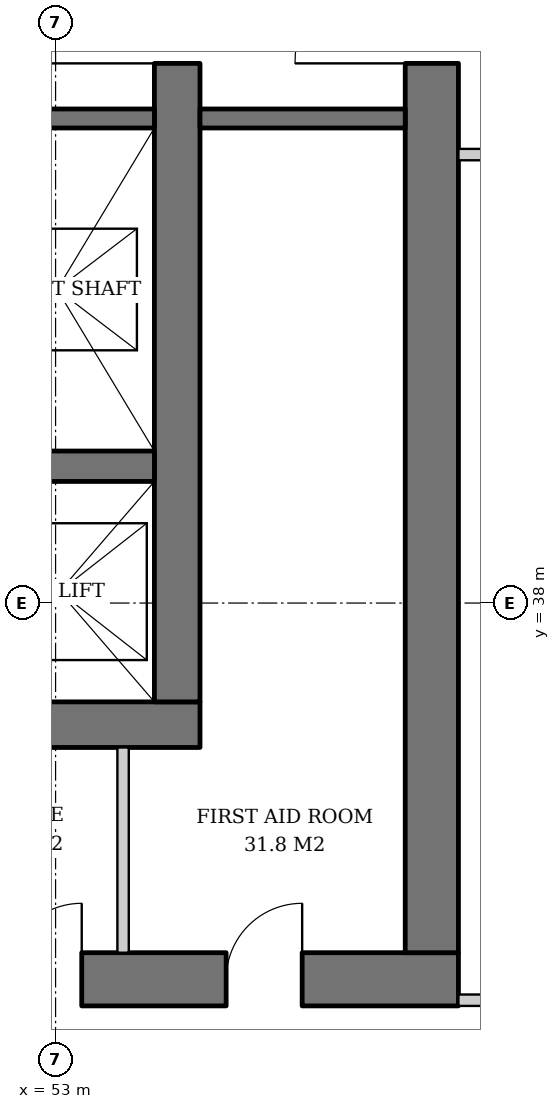
"""IFC4 building model, lengths in metres.
Left out: names, types, materials, properties, quantities, classifications, styles, units other than length and angle.
Written with IfcOpenShell. Run it as: python <this file> out.ifc"""

import sys

from ifc_helpers import new_model, si_unit, direction, frame, frame_2d, origin, place, context, subcontext, project, spatial, rectangle, extrude, element, fill, save


model = new_model("IFC4")
c1 = context("Model", 3, precision=1e-05, world=origin(), true_north=direction((0.0, 1.0)))
c2 = subcontext(c1, "Body", "Model", "MODEL_VIEW")
j1 = project(units=[si_unit("LENGTHUNIT", "METRE"), si_unit("PLANEANGLEUNIT", "RADIAN")], contexts=[c1])
p1 = place(None, origin())
s1 = spatial("IfcSite", under=j1, at=p1, CompositionType="ELEMENT")
p2 = place(p1, origin())
s2 = spatial("IfcBuilding", under=s1, at=p2, CompositionType="ELEMENT")
p3 = place(p2, frame((0.0, 0.0, 150.2)))
s3 = spatial("IfcBuildingStorey", under=s2, at=p3, CompositionType="ELEMENT", Elevation=150.2)
p4 = place(p3, frame((35.1, 36.4, 0.0), z_axis=(0.0, 0.0, 1.0), x_axis=(1.0, 0.0, 0.0)))
e1 = element("IfcWall", 1, at=p4, inside=s3, PredefinedType="SHEAR", context=c2, shape_type="SweptSolid", body=[
    extrude(rectangle(XDim=19.8, YDim=0.6, at=frame_2d((9.9, 0.0))), origin(), (0.0, 0.0, 1.0), 3.8),
])
p5 = place(p4, frame((3.9, 0.0, 0.0)))
e2 = element("IfcOpeningElement", 2, at=p5, cuts=e1, PredefinedType="OPENING", context=c2, shape_type="SweptSolid", body=[
    extrude(rectangle(XDim=1.0, YDim=2.1, at=frame_2d((0.5, 1.05))), frame((0.0, 0.31, 0.0), z_axis=(0.0, -1.0, 0.0), x_axis=(1.0, 0.0, 0.0)), (0.0, 0.0, 1.0), 0.62),
])
p6 = place(p4, frame((15.35, 0.0, 0.0)))
e3 = element("IfcOpeningElement", 3, at=p6, cuts=e1, PredefinedType="OPENING", context=c2, shape_type="SweptSolid", body=[
    extrude(rectangle(XDim=1.0, YDim=2.1, at=frame_2d((0.5, 1.05))), frame((0.0, 0.31, 0.0), z_axis=(0.0, -1.0, 0.0), x_axis=(1.0, 0.0, 0.0)), (0.0, 0.0, 1.0), 0.62),
])
p7 = place(p3, frame((54.6, 36.7, 0.0), z_axis=(0.0, 0.0, 1.0), x_axis=(0.0, 1.0, 0.0)))
e4 = element("IfcWall", 4, at=p7, inside=s3, PredefinedType="SHEAR", context=c2, shape_type="SweptSolid", body=[
    extrude(rectangle(XDim=18.6, YDim=0.6, at=frame_2d((9.3, 0.0))), origin(), (0.0, 0.0, 1.0), 3.8),
])
p8 = place(p7, frame((8.4, 0.0, 0.0)))
e5 = element("IfcOpeningElement", 5, at=p8, cuts=e4, PredefinedType="OPENING", context=c2, shape_type="SweptSolid", body=[
    extrude(rectangle(XDim=1.8, YDim=2.4, at=frame_2d((0.9, 1.2))), frame((0.0, 0.31, 0.0), z_axis=(0.0, -1.0, 0.0), x_axis=(1.0, 0.0, 0.0)), (0.0, 0.0, 1.0), 0.62),
])
p9 = place(p3, frame((31.7, 33.05, 0.0), z_axis=(0.0, 0.0, 1.0), x_axis=(1.0, 0.0, 0.0)))
e6 = element("IfcWall", 6, at=p9, inside=s3, PredefinedType="SHEAR", context=c2, shape_type="SweptSolid", body=[
    extrude(rectangle(XDim=26.6, YDim=0.7, at=frame_2d((13.3, 0.0))), origin(), (0.0, 0.0, 1.0), 3.8),
])
p10 = place(p9, frame((7.3, 0.0, 0.0)))
e7 = element("IfcOpeningElement", 7, at=p10, cuts=e6, PredefinedType="OPENING", context=c2, shape_type="SweptSolid", body=[
    extrude(rectangle(XDim=1.0, YDim=2.1, at=frame_2d((0.5, 1.05))), frame((0.0, 0.36, 0.0), z_axis=(0.0, -1.0, 0.0), x_axis=(1.0, 0.0, 0.0)), (0.0, 0.0, 1.0), 0.72),
])
p11 = place(p9, frame((18.75, 0.0, 0.0)))
e8 = element("IfcOpeningElement", 8, at=p11, cuts=e6, PredefinedType="OPENING", context=c2, shape_type="SweptSolid", body=[
    extrude(rectangle(XDim=1.0, YDim=2.1, at=frame_2d((0.5, 1.05))), frame((0.0, 0.36, 0.0), z_axis=(0.0, -1.0, 0.0), x_axis=(1.0, 0.0, 0.0)), (0.0, 0.0, 1.0), 0.72),
])
p12 = place(p9, frame((1.85, 0.0, 0.0)))
e9 = element("IfcOpeningElement", 9, at=p12, cuts=e6, PredefinedType="OPENING", context=c2, shape_type="SweptSolid", body=[
    extrude(rectangle(XDim=1.0, YDim=2.1, at=frame_2d((0.5, 1.05))), frame((0.0, 0.36, 0.0), z_axis=(0.0, -1.0, 0.0), x_axis=(1.0, 0.0, 0.0)), (0.0, 0.0, 1.0), 0.72),
])
p13 = place(p9, frame((4.7, 0.0, 0.0)))
e10 = element("IfcOpeningElement", 10, at=p13, cuts=e6, PredefinedType="OPENING", context=c2, shape_type="SweptSolid", body=[
    extrude(rectangle(XDim=1.0, YDim=2.1, at=frame_2d((0.5, 1.05))), frame((0.0, 0.36, 0.0), z_axis=(0.0, -1.0, 0.0), x_axis=(1.0, 0.0, 0.0)), (0.0, 0.0, 1.0), 0.72),
])
p14 = place(p9, frame((12.44, 0.0, 0.0)))
e11 = element("IfcOpeningElement", 11, at=p14, cuts=e6, PredefinedType="OPENING", context=c2, shape_type="SweptSolid", body=[
    extrude(rectangle(XDim=1.0, YDim=2.1, at=frame_2d((0.5, 1.05))), frame((0.0, 0.36, 0.0), z_axis=(0.0, -1.0, 0.0), x_axis=(1.0, 0.0, 0.0)), (0.0, 0.0, 1.0), 0.72),
])
p15 = place(p9, frame((20.644, 0.0, 0.0)))
e12 = element("IfcOpeningElement", 12, at=p15, cuts=e6, PredefinedType="OPENING", context=c2, shape_type="SweptSolid", body=[
    extrude(rectangle(XDim=1.0, YDim=2.1, at=frame_2d((0.5, 1.05))), frame((0.0, 0.36, 0.0), z_axis=(0.0, -1.0, 0.0), x_axis=(1.0, 0.0, 0.0)), (0.0, 0.0, 1.0), 0.72),
])
p16 = place(p9, frame((23.544, 0.0, 0.0)))
e13 = element("IfcOpeningElement", 13, at=p16, cuts=e6, PredefinedType="OPENING", context=c2, shape_type="SweptSolid", body=[
    extrude(rectangle(XDim=1.0, YDim=2.1, at=frame_2d((0.5, 1.05))), frame((0.0, 0.36, 0.0), z_axis=(0.0, -1.0, 0.0), x_axis=(1.0, 0.0, 0.0)), (0.0, 0.0, 1.0), 0.72),
])
p17 = place(p3, frame((57.95, 33.4, 0.0), z_axis=(0.0, 0.0, 1.0), x_axis=(0.0, 1.0, 0.0)))
e14 = element("IfcWall", 14, at=p17, inside=s3, PredefinedType="SHEAR", context=c2, shape_type="SweptSolid", body=[
    extrude(rectangle(XDim=25.2, YDim=0.7, at=frame_2d((12.6, 0.0))), origin(), (0.0, 0.0, 1.0), 3.8),
])
p18 = place(p17, frame((11.7, 0.0, 0.0)))
e15 = element("IfcOpeningElement", 15, at=p18, cuts=e14, PredefinedType="OPENING", context=c2, shape_type="SweptSolid", body=[
    extrude(rectangle(XDim=1.8, YDim=2.4, at=frame_2d((0.9, 1.2))), frame((0.0, 0.36, 0.0), z_axis=(0.0, -1.0, 0.0), x_axis=(1.0, 0.0, 0.0)), (0.0, 0.0, 1.0), 0.72),
])
p19 = place(p3, frame((35.7, 39.8, 0.0), z_axis=(0.0, 0.0, 1.0), x_axis=(1.0, 0.0, 0.0)))
e16 = element("IfcWall", 16, at=p19, inside=s3, PredefinedType="SHEAR", context=c2, shape_type="SweptSolid", body=[
    extrude(rectangle(XDim=18.6, YDim=0.4, at=frame_2d((9.3, 0.0))), origin(), (0.0, 0.0, 1.0), 3.8),
])
p20 = place(p3, frame((48.93, 44.375, 0.0), z_axis=(0.0, 0.0, 1.0), x_axis=(1.0, 0.0, 0.0)))
e17 = element("IfcWall", 17, at=p20, inside=s3, PredefinedType="SHEAR", context=c2, shape_type="SweptSolid", body=[
    extrude(rectangle(XDim=5.37, YDim=0.25, at=frame_2d((2.685, 0.0))), origin(), (0.0, 0.0, 1.0), 3.8),
])
p21 = place(p3, frame((54.9, 44.375, 0.0), z_axis=(0.0, 0.0, 1.0), x_axis=(1.0, 0.0, 0.0)))
e18 = element("IfcWall", 18, at=p21, inside=s3, PredefinedType="SOLIDWALL", context=c2, shape_type="SweptSolid", body=[
    extrude(rectangle(XDim=2.7, YDim=0.25, at=frame_2d((1.35, 0.0))), origin(), (0.0, 0.0, 1.0), 3.62),
])
p22 = place(p3, frame((53.888, 33.4, 0.0), z_axis=(0.0, 0.0, 1.0), x_axis=(0.0, 1.0, 0.0)))
e19 = element("IfcWall", 19, at=p22, inside=s3, PredefinedType="SOLIDWALL", context=c2, shape_type="SweptSolid", body=[
    extrude(rectangle(XDim=2.7, YDim=0.15, at=frame_2d((1.35, 0.0))), origin(), (0.0, 0.0, 1.0), 3.62),
])
for number, where, z_axis, x_axis in (
    (20, (58.3, 32.775, 0.0), (0.0, 0.0, 1.0), (1.0, 0.0, 0.0)),
    (21, (58.3, 43.9, 0.0), (0.0, 0.0, 1.0), (1.0, 0.0, 0.0)),
):
    element("IfcWall", number, at=place(p3, frame(where, z_axis=z_axis, x_axis=x_axis)), inside=s3, PredefinedType="PARTITIONING", context=c2, shape_type="SweptSolid", body=[
        extrude(rectangle(XDim=2.325, YDim=0.15, at=frame_2d((1.163, 0.0))), origin(), (0.0, 0.0, 1.0), 3.62),
    ])
p23 = place(p8, origin())
e22 = element("IfcDoor", 22, at=p23, inside=s3, OperationType="DOUBLE_DOOR_SINGLE_SWING", PredefinedType="DOOR", context=c2, shape_type="SweptSolid", body=[
    extrude(rectangle(XDim=1.8, YDim=2.4, at=frame_2d((0.9, 1.2))), frame((0.0, 0.025, 0.0), z_axis=(0.0, -1.0, 0.0), x_axis=(1.0, 0.0, 0.0)), (0.0, 0.0, 1.0), 0.05),
])
fill(e5, e22)
p24 = place(p18, origin())
e23 = element("IfcDoor", 23, at=p24, inside=s3, OperationType="DOUBLE_DOOR_SINGLE_SWING", PredefinedType="DOOR", context=c2, shape_type="SweptSolid", body=[
    extrude(rectangle(XDim=1.8, YDim=2.4, at=frame_2d((0.9, 1.2))), frame((0.0, 0.025, 0.0), z_axis=(0.0, -1.0, 0.0), x_axis=(1.0, 0.0, 0.0)), (0.0, 0.0, 1.0), 0.05),
])
fill(e15, e23)
p25 = place(p15, origin())
e24 = element("IfcDoor", 24, at=p25, inside=s3, OperationType="SINGLE_SWING_RIGHT", PredefinedType="DOOR", context=c2, shape_type="SweptSolid", body=[
    extrude(rectangle(XDim=1.0, YDim=2.1, at=frame_2d((0.5, 1.05))), frame((0.0, 0.34, 0.0), z_axis=(0.0, -1.0, 0.0), x_axis=(1.0, 0.0, 0.0)), (0.0, 0.0, 1.0), 0.05),
])
fill(e12, e24)
p26 = place(p16, origin())
e25 = element("IfcDoor", 25, at=p26, inside=s3, OperationType="SINGLE_SWING_RIGHT", PredefinedType="DOOR", context=c2, shape_type="SweptSolid", body=[
    extrude(rectangle(XDim=1.0, YDim=2.1, at=frame_2d((0.5, 1.05))), frame((0.0, 0.34, 0.0), z_axis=(0.0, -1.0, 0.0), x_axis=(1.0, 0.0, 0.0)), (0.0, 0.0, 1.0), 0.05),
])
fill(e13, e25)
save(model, sys.argv[1])
